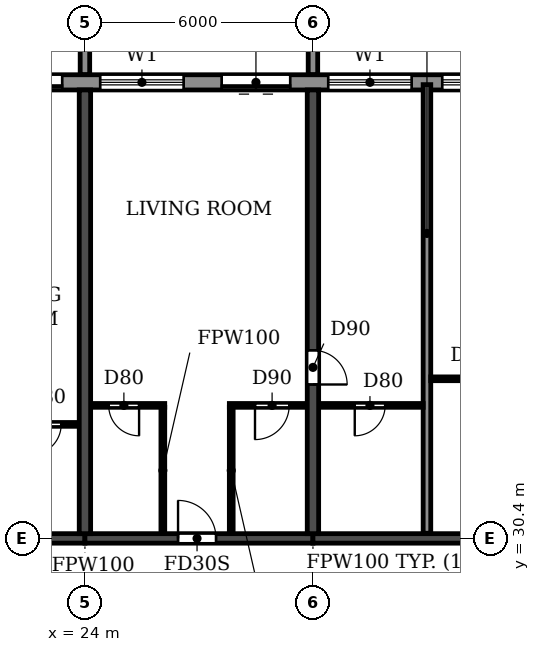
"""IFC4 building model, lengths in metres.
Left out: names, types, materials, properties, quantities, classifications, styles, units other than length and angle.
Written with IfcOpenShell. Run it as: python <this file> out.ifc"""

import sys

from ifc_helpers import new_model, si_unit, direction, frame, frame_2d, origin, place, context, subcontext, project, spatial, polyline, rectangle, outline, extrude, source, transform, mapped, element, fill, save


model = new_model("IFC4")
c1 = context("Model", 3, precision=1e-05, world=origin(), true_north=direction((0.0, 1.0)))
c2 = subcontext(c1, "Body", "Model", "MODEL_VIEW")
j1 = project(units=[si_unit("LENGTHUNIT", "METRE"), si_unit("PLANEANGLEUNIT", "RADIAN")], contexts=[c1])
p1 = place(None, origin())
s1 = spatial("IfcSite", under=j1, at=p1, CompositionType="ELEMENT")
p2 = place(p1, origin())
s2 = spatial("IfcBuilding", under=s1, at=p2, CompositionType="ELEMENT")
p3 = place(p2, frame((0.0, 0.0, 142.2)))
s3 = spatial("IfcBuildingStorey", under=s2, at=p3, CompositionType="ELEMENT", Elevation=142.2)
p4 = place(p3, frame((24.0, 30.525, 0.0), z_axis=(0.0, 0.0, 1.0), x_axis=(0.0, 1.0, 0.0)))
e1 = element("IfcWall", 1, at=p4, inside=s3, PredefinedType="SHEAR", context=c2, shape_type="SweptSolid", body=[
    extrude(rectangle(XDim=11.675, YDim=0.3, at=frame_2d((5.837, 0.0))), origin(), (0.0, 0.0, 1.0), 3.07),
])
p5 = place(p3, frame((30.0, 30.525, 0.0), z_axis=(0.0, 0.0, 1.0), x_axis=(0.0, 1.0, 0.0)))
e2 = element("IfcWall", 2, at=p5, inside=s3, PredefinedType="SHEAR", context=c2, shape_type="SweptSolid", body=[
    extrude(rectangle(XDim=11.675, YDim=0.3, at=frame_2d((5.837, 0.0))), origin(), (0.0, 0.0, 1.0), 3.07),
])
p6 = place(p5, frame((3.925, 0.0, 0.0)))
e3 = element("IfcOpeningElement", 3, at=p6, cuts=e2, PredefinedType="OPENING", context=c2, shape_type="SweptSolid", body=[
    extrude(rectangle(XDim=0.9, YDim=2.1, at=frame_2d((0.45, 1.05))), frame((0.0, 0.16, 0.0), z_axis=(0.0, -1.0, 0.0), x_axis=(1.0, 0.0, 0.0)), (0.0, 0.0, 1.0), 0.32),
])
p7 = place(p3, frame((18.0, 30.4, 0.0), z_axis=(0.0, 0.0, 1.0), x_axis=(1.0, 0.0, 0.0)))
e4 = element("IfcWall", 4, at=p7, inside=s3, PredefinedType="SHEAR", context=c2, shape_type="SweptSolid", body=[
    extrude(rectangle(XDim=6.0, YDim=0.25, at=frame_2d((3.0, 0.0))), origin(), (0.0, 0.0, 1.0), 2.47),
])
p8 = place(p7, frame((2.55, 0.0, 0.0)))
e5 = element("IfcOpeningElement", 5, at=p8, cuts=e4, PredefinedType="OPENING", context=c2, shape_type="SweptSolid", body=[
    extrude(rectangle(XDim=1.0, YDim=2.1, at=frame_2d((0.5, 1.05))), frame((0.0, 0.135, 0.0), z_axis=(0.0, -1.0, 0.0), x_axis=(1.0, 0.0, 0.0)), (0.0, 0.0, 1.0), 0.27),
])
p9 = place(p3, frame((24.0, 30.4, 0.0), z_axis=(0.0, 0.0, 1.0), x_axis=(1.0, 0.0, 0.0)))
e6 = element("IfcWall", 6, at=p9, inside=s3, PredefinedType="SHEAR", context=c2, shape_type="SweptSolid", body=[
    extrude(rectangle(XDim=6.0, YDim=0.25, at=frame_2d((3.0, 0.0))), origin(), (0.0, 0.0, 1.0), 2.47),
])
p10 = place(p9, frame((2.45, 0.0, 0.0)))
e7 = element("IfcOpeningElement", 7, at=p10, cuts=e6, PredefinedType="OPENING", context=c2, shape_type="SweptSolid", body=[
    extrude(rectangle(XDim=1.0, YDim=2.1, at=frame_2d((0.5, 1.05))), frame((0.0, 0.135, 0.0), z_axis=(0.0, -1.0, 0.0), x_axis=(1.0, 0.0, 0.0)), (0.0, 0.0, 1.0), 0.27),
])
p11 = place(p3, frame((30.0, 30.4, 0.0), z_axis=(0.0, 0.0, 1.0), x_axis=(1.0, 0.0, 0.0)))
e8 = element("IfcWall", 8, at=p11, inside=s3, PredefinedType="SHEAR", context=c2, shape_type="SweptSolid", body=[
    extrude(rectangle(XDim=6.0, YDim=0.25, at=frame_2d((3.0, 0.0))), origin(), (0.0, 0.0, 1.0), 2.47),
])
p12 = place(p3, frame((85.317, 42.4, 0.0), z_axis=(0.0, 0.0, 1.0), x_axis=(-1.0, 0.0, 0.0)))
e9 = element("IfcWall", 9, at=p12, inside=s3, PredefinedType="STANDARD", context=c2, shape_type="SweptSolid", body=[
    extrude(rectangle(XDim=68.634, YDim=0.4, at=frame_2d((34.317, 0.0))), origin(), (0.0, 0.0, 1.0), 3.07),
])
p13 = place(p12, frame((64.717, 0.0, 0.9)))
e10 = element("IfcOpeningElement", 10, at=p13, cuts=e9, PredefinedType="OPENING", context=c2, shape_type="SweptSolid", body=[
    extrude(rectangle(XDim=2.2, YDim=1.5, at=frame_2d((1.1, 0.75))), frame((0.0, 0.21, 0.0), z_axis=(0.0, -1.0, 0.0), x_axis=(1.0, 0.0, 0.0)), (0.0, 0.0, 1.0), 0.42),
])
p14 = place(p12, frame((61.917, 0.0, 0.0)))
e11 = element("IfcOpeningElement", 11, at=p14, cuts=e9, PredefinedType="OPENING", context=c2, shape_type="SweptSolid", body=[
    extrude(rectangle(XDim=1.8, YDim=2.4, at=frame_2d((0.9, 1.2))), frame((0.0, 0.21, 0.0), z_axis=(0.0, -1.0, 0.0), x_axis=(1.0, 0.0, 0.0)), (0.0, 0.0, 1.0), 0.42),
])
p15 = place(p12, frame((58.717, 0.0, 0.9)))
e12 = element("IfcOpeningElement", 12, at=p15, cuts=e9, PredefinedType="OPENING", context=c2, shape_type="SweptSolid", body=[
    extrude(rectangle(XDim=2.2, YDim=1.5, at=frame_2d((1.1, 0.75))), frame((0.0, 0.21, 0.0), z_axis=(0.0, -1.0, 0.0), x_axis=(1.0, 0.0, 0.0)), (0.0, 0.0, 1.0), 0.42),
])
p16 = place(p12, frame((55.917, 0.0, 0.0)))
e13 = element("IfcOpeningElement", 13, at=p16, cuts=e9, PredefinedType="OPENING", context=c2, shape_type="SweptSolid", body=[
    extrude(rectangle(XDim=1.8, YDim=2.4, at=frame_2d((0.9, 1.2))), frame((0.0, 0.21, 0.0), z_axis=(0.0, -1.0, 0.0), x_axis=(1.0, 0.0, 0.0)), (0.0, 0.0, 1.0), 0.42),
])
p17 = place(p12, frame((52.717, 0.0, 0.9)))
e14 = element("IfcOpeningElement", 14, at=p17, cuts=e9, PredefinedType="OPENING", context=c2, shape_type="SweptSolid", body=[
    extrude(rectangle(XDim=2.2, YDim=1.5, at=frame_2d((1.1, 0.75))), frame((0.0, 0.21, 0.0), z_axis=(0.0, -1.0, 0.0), x_axis=(1.0, 0.0, 0.0)), (0.0, 0.0, 1.0), 0.42),
])
p18 = place(p12, frame((49.717, 0.0, 0.9)))
e15 = element("IfcOpeningElement", 15, at=p18, cuts=e9, PredefinedType="OPENING", context=c2, shape_type="SweptSolid", body=[
    extrude(rectangle(XDim=2.2, YDim=1.5, at=frame_2d((1.1, 0.75))), frame((0.0, 0.21, 0.0), z_axis=(0.0, -1.0, 0.0), x_axis=(1.0, 0.0, 0.0)), (0.0, 0.0, 1.0), 0.42),
])
p19 = place(p12, frame((46.917, 0.0, 0.0)))
e16 = element("IfcOpeningElement", 16, at=p19, cuts=e9, PredefinedType="OPENING", context=c2, shape_type="SweptSolid", body=[
    extrude(rectangle(XDim=1.8, YDim=2.4, at=frame_2d((0.9, 1.2))), frame((0.0, 0.21, 0.0), z_axis=(0.0, -1.0, 0.0), x_axis=(1.0, 0.0, 0.0)), (0.0, 0.0, 1.0), 0.42),
])
p20 = place(p12, frame((43.717, 0.0, 0.9)))
e17 = element("IfcOpeningElement", 17, at=p20, cuts=e9, PredefinedType="OPENING", context=c2, shape_type="SweptSolid", body=[
    extrude(rectangle(XDim=2.2, YDim=1.5, at=frame_2d((1.1, 0.75))), frame((0.0, 0.21, 0.0), z_axis=(0.0, -1.0, 0.0), x_axis=(1.0, 0.0, 0.0)), (0.0, 0.0, 1.0), 0.42),
])
p21 = place(p12, frame((40.717, 0.0, 0.9)))
e18 = element("IfcOpeningElement", 18, at=p21, cuts=e9, PredefinedType="OPENING", context=c2, shape_type="SweptSolid", body=[
    extrude(rectangle(XDim=2.2, YDim=1.5, at=frame_2d((1.1, 0.75))), frame((0.0, 0.21, 0.0), z_axis=(0.0, -1.0, 0.0), x_axis=(1.0, 0.0, 0.0)), (0.0, 0.0, 1.0), 0.42),
])
p22 = place(p12, frame((37.717, 0.0, 0.9)))
e19 = element("IfcOpeningElement", 19, at=p22, cuts=e9, PredefinedType="OPENING", context=c2, shape_type="SweptSolid", body=[
    extrude(rectangle(XDim=2.2, YDim=1.5, at=frame_2d((1.1, 0.75))), frame((0.0, 0.21, 0.0), z_axis=(0.0, -1.0, 0.0), x_axis=(1.0, 0.0, 0.0)), (0.0, 0.0, 1.0), 0.42),
])
p23 = place(p12, frame((34.717, 0.0, 0.9)))
e20 = element("IfcOpeningElement", 20, at=p23, cuts=e9, PredefinedType="OPENING", context=c2, shape_type="SweptSolid", body=[
    extrude(rectangle(XDim=2.2, YDim=1.5, at=frame_2d((1.1, 0.75))), frame((0.0, 0.21, 0.0), z_axis=(0.0, -1.0, 0.0), x_axis=(1.0, 0.0, 0.0)), (0.0, 0.0, 1.0), 0.42),
])
p24 = place(p12, frame((31.917, 0.0, 0.0)))
e21 = element("IfcOpeningElement", 21, at=p24, cuts=e9, PredefinedType="OPENING", context=c2, shape_type="SweptSolid", body=[
    extrude(rectangle(XDim=1.8, YDim=2.4, at=frame_2d((0.9, 1.2))), frame((0.0, 0.21, 0.0), z_axis=(0.0, -1.0, 0.0), x_axis=(1.0, 0.0, 0.0)), (0.0, 0.0, 1.0), 0.42),
])
p25 = place(p12, frame((28.917, 0.0, 0.0)))
e22 = element("IfcOpeningElement", 22, at=p25, cuts=e9, PredefinedType="OPENING", context=c2, shape_type="SweptSolid", body=[
    extrude(rectangle(XDim=1.8, YDim=2.4, at=frame_2d((0.9, 1.2))), frame((0.0, 0.21, 0.0), z_axis=(0.0, -1.0, 0.0), x_axis=(1.0, 0.0, 0.0)), (0.0, 0.0, 1.0), 0.42),
])
p26 = place(p12, frame((25.717, 0.0, 0.9)))
e23 = element("IfcOpeningElement", 23, at=p26, cuts=e9, PredefinedType="OPENING", context=c2, shape_type="SweptSolid", body=[
    extrude(rectangle(XDim=2.2, YDim=1.5, at=frame_2d((1.1, 0.75))), frame((0.0, 0.21, 0.0), z_axis=(0.0, -1.0, 0.0), x_axis=(1.0, 0.0, 0.0)), (0.0, 0.0, 1.0), 0.42),
])
p27 = place(p12, frame((22.717, 0.0, 0.9)))
e24 = element("IfcOpeningElement", 24, at=p27, cuts=e9, PredefinedType="OPENING", context=c2, shape_type="SweptSolid", body=[
    extrude(rectangle(XDim=2.2, YDim=1.5, at=frame_2d((1.1, 0.75))), frame((0.0, 0.21, 0.0), z_axis=(0.0, -1.0, 0.0), x_axis=(1.0, 0.0, 0.0)), (0.0, 0.0, 1.0), 0.42),
])
p28 = place(p12, frame((19.717, 0.0, 0.9)))
e25 = element("IfcOpeningElement", 25, at=p28, cuts=e9, PredefinedType="OPENING", context=c2, shape_type="SweptSolid", body=[
    extrude(rectangle(XDim=2.2, YDim=1.5, at=frame_2d((1.1, 0.75))), frame((0.0, 0.21, 0.0), z_axis=(0.0, -1.0, 0.0), x_axis=(1.0, 0.0, 0.0)), (0.0, 0.0, 1.0), 0.42),
])
p29 = place(p12, frame((16.717, 0.0, 0.9)))
e26 = element("IfcOpeningElement", 26, at=p29, cuts=e9, PredefinedType="OPENING", context=c2, shape_type="SweptSolid", body=[
    extrude(rectangle(XDim=2.2, YDim=1.5, at=frame_2d((1.1, 0.75))), frame((0.0, 0.21, 0.0), z_axis=(0.0, -1.0, 0.0), x_axis=(1.0, 0.0, 0.0)), (0.0, 0.0, 1.0), 0.42),
])
p30 = place(p12, frame((13.917, 0.0, 0.0)))
e27 = element("IfcOpeningElement", 27, at=p30, cuts=e9, PredefinedType="OPENING", context=c2, shape_type="SweptSolid", body=[
    extrude(rectangle(XDim=1.8, YDim=2.4, at=frame_2d((0.9, 1.2))), frame((0.0, 0.21, 0.0), z_axis=(0.0, -1.0, 0.0), x_axis=(1.0, 0.0, 0.0)), (0.0, 0.0, 1.0), 0.42),
])
p31 = place(p12, frame((10.917, 0.0, 0.0)))
e28 = element("IfcOpeningElement", 28, at=p31, cuts=e9, PredefinedType="OPENING", context=c2, shape_type="SweptSolid", body=[
    extrude(rectangle(XDim=1.8, YDim=2.4, at=frame_2d((0.9, 1.2))), frame((0.0, 0.21, 0.0), z_axis=(0.0, -1.0, 0.0), x_axis=(1.0, 0.0, 0.0)), (0.0, 0.0, 1.0), 0.42),
])
p32 = place(p12, frame((7.717, 0.0, 0.9)))
e29 = element("IfcOpeningElement", 29, at=p32, cuts=e9, PredefinedType="OPENING", context=c2, shape_type="SweptSolid", body=[
    extrude(rectangle(XDim=2.2, YDim=1.5, at=frame_2d((1.1, 0.75))), frame((0.0, 0.21, 0.0), z_axis=(0.0, -1.0, 0.0), x_axis=(1.0, 0.0, 0.0)), (0.0, 0.0, 1.0), 0.42),
])
p33 = place(p12, frame((4.717, 0.0, 0.9)))
e30 = element("IfcOpeningElement", 30, at=p33, cuts=e9, PredefinedType="OPENING", context=c2, shape_type="SweptSolid", body=[
    extrude(rectangle(XDim=2.2, YDim=1.5, at=frame_2d((1.1, 0.75))), frame((0.0, 0.21, 0.0), z_axis=(0.0, -1.0, 0.0), x_axis=(1.0, 0.0, 0.0)), (0.0, 0.0, 1.0), 0.42),
])
p34 = place(p12, frame((1.917, 0.0, 0.0)))
e31 = element("IfcOpeningElement", 31, at=p34, cuts=e9, PredefinedType="OPENING", context=c2, shape_type="SweptSolid", body=[
    extrude(rectangle(XDim=1.8, YDim=2.4, at=frame_2d((0.9, 1.2))), frame((0.0, 0.21, 0.0), z_axis=(0.0, -1.0, 0.0), x_axis=(1.0, 0.0, 0.0)), (0.0, 0.0, 1.0), 0.42),
])
m1 = source(origin(), c2, "Body", "SweptSolid", [
    extrude(outline(polyline([(0.0, 0.0), (0.25, 0.0), (0.25, 3.1), (0.0, 3.1), (0.0, 0.0)])), origin(), (0.0, 0.0, 1.0), 3.1),
])
for number, where in (
    (32, (23.875, 42.6, 0.0)),
    (33, (29.875, 42.6, 0.0)),
):
    element("IfcWall", number, at=place(p3, frame(where)), inside=s3, PredefinedType="STANDARD", context=c2, shape_type="MappedRepresentation", body=[
        mapped(m1, transform((0.0, 0.0, 0.0))),
    ])
p35 = place(p3, frame((33.0, 30.535, 0.0), z_axis=(0.0, 0.0, 1.0), x_axis=(0.0, 1.0, 0.0)))
e34 = element("IfcWall", 34, at=p35, inside=s3, PredefinedType="PARTITIONING", context=c2, shape_type="SweptSolid", body=[
    extrude(rectangle(XDim=11.805, YDim=0.2, at=frame_2d((5.903, 0.0))), origin(), (0.0, 0.0, 1.0), 3.07),
])
p36 = place(p3, frame((21.9, 33.4, 0.0), z_axis=(0.0, 0.0, 1.0), x_axis=(1.0, 0.0, 0.0)))
e35 = element("IfcWall", 35, at=p36, inside=s3, PredefinedType="PARTITIONING", context=c2, shape_type="SweptSolid", body=[
    extrude(rectangle(XDim=1.94, YDim=0.1, at=frame_2d((0.97, 0.0))), origin(), (0.0, 0.0, 1.0), 3.07),
])
p37 = place(p36, frame((0.675, 0.0, 0.0)))
e36 = element("IfcOpeningElement", 36, at=p37, cuts=e35, PredefinedType="OPENING", context=c2, shape_type="SweptSolid", body=[
    extrude(rectangle(XDim=0.8, YDim=2.1, at=frame_2d((0.4, 1.05))), frame((0.0, 0.06, 0.0), z_axis=(0.0, -1.0, 0.0), x_axis=(1.0, 0.0, 0.0)), (0.0, 0.0, 1.0), 0.12),
])
p38 = place(p3, frame((24.16, 33.9, 0.0), z_axis=(0.0, 0.0, 1.0), x_axis=(1.0, 0.0, 0.0)))
e37 = element("IfcWall", 37, at=p38, inside=s3, PredefinedType="PARTITIONING", context=c2, shape_type="SweptSolid", body=[
    extrude(rectangle(XDim=1.94, YDim=0.1, at=frame_2d((0.97, 0.0))), origin(), (0.0, 0.0, 1.0), 3.07),
])
p39 = place(p38, frame((0.465, 0.0, 0.0)))
e38 = element("IfcOpeningElement", 38, at=p39, cuts=e37, PredefinedType="OPENING", context=c2, shape_type="SweptSolid", body=[
    extrude(rectangle(XDim=0.8, YDim=2.1, at=frame_2d((0.4, 1.05))), frame((0.0, 0.06, 0.0), z_axis=(0.0, -1.0, 0.0), x_axis=(1.0, 0.0, 0.0)), (0.0, 0.0, 1.0), 0.12),
])
p40 = place(p3, frame((27.8, 33.9, 0.0), z_axis=(0.0, 0.0, 1.0), x_axis=(1.0, 0.0, 0.0)))
e39 = element("IfcWall", 39, at=p40, inside=s3, PredefinedType="PARTITIONING", context=c2, shape_type="SweptSolid", body=[
    extrude(rectangle(XDim=2.04, YDim=0.1, at=frame_2d((1.02, 0.0))), origin(), (0.0, 0.0, 1.0), 3.07),
])
p41 = place(p40, frame((0.675, 0.0, 0.0)))
e40 = element("IfcOpeningElement", 40, at=p41, cuts=e39, PredefinedType="OPENING", context=c2, shape_type="SweptSolid", body=[
    extrude(rectangle(XDim=0.9, YDim=2.1, at=frame_2d((0.45, 1.05))), frame((0.0, 0.06, 0.0), z_axis=(0.0, -1.0, 0.0), x_axis=(1.0, 0.0, 0.0)), (0.0, 0.0, 1.0), 0.12),
])
p42 = place(p3, frame((30.16, 33.9, 0.0), z_axis=(0.0, 0.0, 1.0), x_axis=(1.0, 0.0, 0.0)))
e41 = element("IfcWall", 41, at=p42, inside=s3, PredefinedType="PARTITIONING", context=c2, shape_type="SweptSolid", body=[
    extrude(rectangle(XDim=2.74, YDim=0.1, at=frame_2d((1.37, 0.0))), origin(), (0.0, 0.0, 1.0), 3.07),
])
p43 = place(p42, frame((0.94, 0.0, 0.0)))
e42 = element("IfcOpeningElement", 42, at=p43, cuts=e41, PredefinedType="OPENING", context=c2, shape_type="SweptSolid", body=[
    extrude(rectangle(XDim=0.8, YDim=2.1, at=frame_2d((0.4, 1.05))), frame((0.0, 0.06, 0.0), z_axis=(0.0, -1.0, 0.0), x_axis=(1.0, 0.0, 0.0)), (0.0, 0.0, 1.0), 0.12),
])
p44 = place(p3, frame((33.1, 34.6, 0.0), z_axis=(0.0, 0.0, 1.0), x_axis=(1.0, 0.0, 0.0)))
e43 = element("IfcWall", 43, at=p44, inside=s3, PredefinedType="PARTITIONING", context=c2, shape_type="SweptSolid", body=[
    extrude(rectangle(XDim=2.74, YDim=0.1, at=frame_2d((1.37, 0.0))), origin(), (0.0, 0.0, 1.0), 3.07),
])
p45 = place(p44, frame((1.0, 0.0, 0.0)))
e44 = element("IfcOpeningElement", 44, at=p45, cuts=e43, PredefinedType="OPENING", context=c2, shape_type="SweptSolid", body=[
    extrude(rectangle(XDim=0.8, YDim=2.1, at=frame_2d((0.4, 1.05))), frame((0.0, 0.06, 0.0), z_axis=(0.0, -1.0, 0.0), x_axis=(1.0, 0.0, 0.0)), (0.0, 0.0, 1.0), 0.12),
])
for number, where, z_axis, x_axis in (
    (45, (26.05, 30.535, 0.0), (0.0, 0.0, 1.0), (0.0, 1.0, 0.0)),
    (46, (27.85, 30.535, 0.0), (0.0, 0.0, 1.0), (0.0, 1.0, 0.0)),
):
    element("IfcWall", number, at=place(p3, frame(where, z_axis=z_axis, x_axis=x_axis)), inside=s3, PredefinedType="PARTITIONING", context=c2, shape_type="SweptSolid", body=[
        extrude(rectangle(XDim=3.315, YDim=0.1, at=frame_2d((1.658, 0.0))), origin(), (0.0, 0.0, 1.0), 3.07),
    ])
p46 = place(p14, origin())
e47 = element("IfcDoor", 47, at=p46, inside=s3, OperationType="DOUBLE_DOOR_SLIDING", PredefinedType="DOOR", context=c2, shape_type="SweptSolid", body=[
    extrude(rectangle(XDim=1.8, YDim=2.4, at=frame_2d((0.9, 1.2))), frame((0.0, 0.025, 0.0), z_axis=(0.0, -1.0, 0.0), x_axis=(1.0, 0.0, 0.0)), (0.0, 0.0, 1.0), 0.05),
])
fill(e11, e47)
p47 = place(p15, origin())
e48 = element("IfcWindow", 48, at=p47, inside=s3, PartitioningType="DOUBLE_PANEL_HORIZONTAL", PredefinedType="WINDOW", context=c2, shape_type="SweptSolid", body=[
    extrude(rectangle(XDim=2.2, YDim=1.5, at=frame_2d((1.1, 0.75))), frame((0.0, 0.03, 0.0), z_axis=(0.0, -1.0, 0.0), x_axis=(1.0, 0.0, 0.0)), (0.0, 0.0, 1.0), 0.06),
])
fill(e12, e48)
p48 = place(p16, origin())
e49 = element("IfcDoor", 49, at=p48, inside=s3, OperationType="DOUBLE_DOOR_SLIDING", PredefinedType="DOOR", context=c2, shape_type="SweptSolid", body=[
    extrude(rectangle(XDim=1.8, YDim=2.4, at=frame_2d((0.9, 1.2))), frame((0.0, 0.025, 0.0), z_axis=(0.0, -1.0, 0.0), x_axis=(1.0, 0.0, 0.0)), (0.0, 0.0, 1.0), 0.05),
])
fill(e13, e49)
p49 = place(p17, origin())
e50 = element("IfcWindow", 50, at=p49, inside=s3, PartitioningType="DOUBLE_PANEL_HORIZONTAL", PredefinedType="WINDOW", context=c2, shape_type="SweptSolid", body=[
    extrude(rectangle(XDim=2.2, YDim=1.5, at=frame_2d((1.1, 0.75))), frame((0.0, 0.03, 0.0), z_axis=(0.0, -1.0, 0.0), x_axis=(1.0, 0.0, 0.0)), (0.0, 0.0, 1.0), 0.06),
])
fill(e14, e50)
p50 = place(p18, origin())
e51 = element("IfcWindow", 51, at=p50, inside=s3, PartitioningType="DOUBLE_PANEL_HORIZONTAL", PredefinedType="WINDOW", context=c2, shape_type="SweptSolid", body=[
    extrude(rectangle(XDim=2.2, YDim=1.5, at=frame_2d((1.1, 0.75))), frame((0.0, 0.03, 0.0), z_axis=(0.0, -1.0, 0.0), x_axis=(1.0, 0.0, 0.0)), (0.0, 0.0, 1.0), 0.06),
])
fill(e15, e51)
p51 = place(p37, frame((0.8, 0.0, 0.0), z_axis=(0.0, 0.0, 1.0), x_axis=(-1.0, 0.0, 0.0)))
e52 = element("IfcDoor", 52, at=p51, inside=s3, OperationType="SINGLE_SWING_RIGHT", PredefinedType="DOOR", context=c2, shape_type="SweptSolid", body=[
    extrude(rectangle(XDim=0.8, YDim=2.1, at=frame_2d((0.4, 1.05))), frame((0.0, 0.025, 0.0), z_axis=(0.0, -1.0, 0.0), x_axis=(1.0, 0.0, 0.0)), (0.0, 0.0, 1.0), 0.05),
])
fill(e36, e52)
p52 = place(p43, frame((0.8, 0.0, 0.0), z_axis=(0.0, 0.0, 1.0), x_axis=(-1.0, 0.0, 0.0)))
e53 = element("IfcDoor", 53, at=p52, inside=s3, OperationType="SINGLE_SWING_RIGHT", PredefinedType="DOOR", context=c2, shape_type="SweptSolid", body=[
    extrude(rectangle(XDim=0.8, YDim=2.1, at=frame_2d((0.4, 1.05))), frame((0.0, 0.025, 0.0), z_axis=(0.0, -1.0, 0.0), x_axis=(1.0, 0.0, 0.0)), (0.0, 0.0, 1.0), 0.05),
])
fill(e42, e53)
p53 = place(p39, frame((0.8, 0.0, 0.0), z_axis=(0.0, 0.0, 1.0), x_axis=(-1.0, 0.0, 0.0)))
e54 = element("IfcDoor", 54, at=p53, inside=s3, OperationType="SINGLE_SWING_LEFT", PredefinedType="DOOR", context=c2, shape_type="SweptSolid", body=[
    extrude(rectangle(XDim=0.8, YDim=2.1, at=frame_2d((0.4, 1.05))), frame((0.0, 0.025, 0.0), z_axis=(0.0, -1.0, 0.0), x_axis=(1.0, 0.0, 0.0)), (0.0, 0.0, 1.0), 0.05),
])
fill(e38, e54)
p54 = place(p10, origin())
e55 = element("IfcDoor", 55, at=p54, inside=s3, OperationType="SINGLE_SWING_LEFT", PredefinedType="DOOR", context=c2, shape_type="SweptSolid", body=[
    extrude(rectangle(XDim=1.0, YDim=2.1, at=frame_2d((0.5, 1.05))), frame((0.0, 0.025, 0.0), z_axis=(0.0, -1.0, 0.0), x_axis=(1.0, 0.0, 0.0)), (0.0, 0.0, 1.0), 0.05),
])
fill(e7, e55)
p55 = place(p41, frame((0.9, 0.0, 0.0), z_axis=(0.0, 0.0, 1.0), x_axis=(-1.0, 0.0, 0.0)))
e56 = element("IfcDoor", 56, at=p55, inside=s3, OperationType="SINGLE_SWING_RIGHT", PredefinedType="DOOR", context=c2, shape_type="SweptSolid", body=[
    extrude(rectangle(XDim=0.9, YDim=2.1, at=frame_2d((0.45, 1.05))), frame((0.0, 0.025, 0.0), z_axis=(0.0, -1.0, 0.0), x_axis=(1.0, 0.0, 0.0)), (0.0, 0.0, 1.0), 0.05),
])
fill(e40, e56)
p56 = place(p6, frame((0.9, 0.0, 0.0), z_axis=(0.0, 0.0, 1.0), x_axis=(-1.0, 0.0, 0.0)))
e57 = element("IfcDoor", 57, at=p56, inside=s3, OperationType="SINGLE_SWING_RIGHT", PredefinedType="DOOR", context=c2, shape_type="SweptSolid", body=[
    extrude(rectangle(XDim=0.9, YDim=2.1, at=frame_2d((0.45, 1.05))), frame((0.0, 0.025, 0.0), z_axis=(0.0, -1.0, 0.0), x_axis=(1.0, 0.0, 0.0)), (0.0, 0.0, 1.0), 0.05),
])
fill(e3, e57)
save(model, sys.argv[1])
